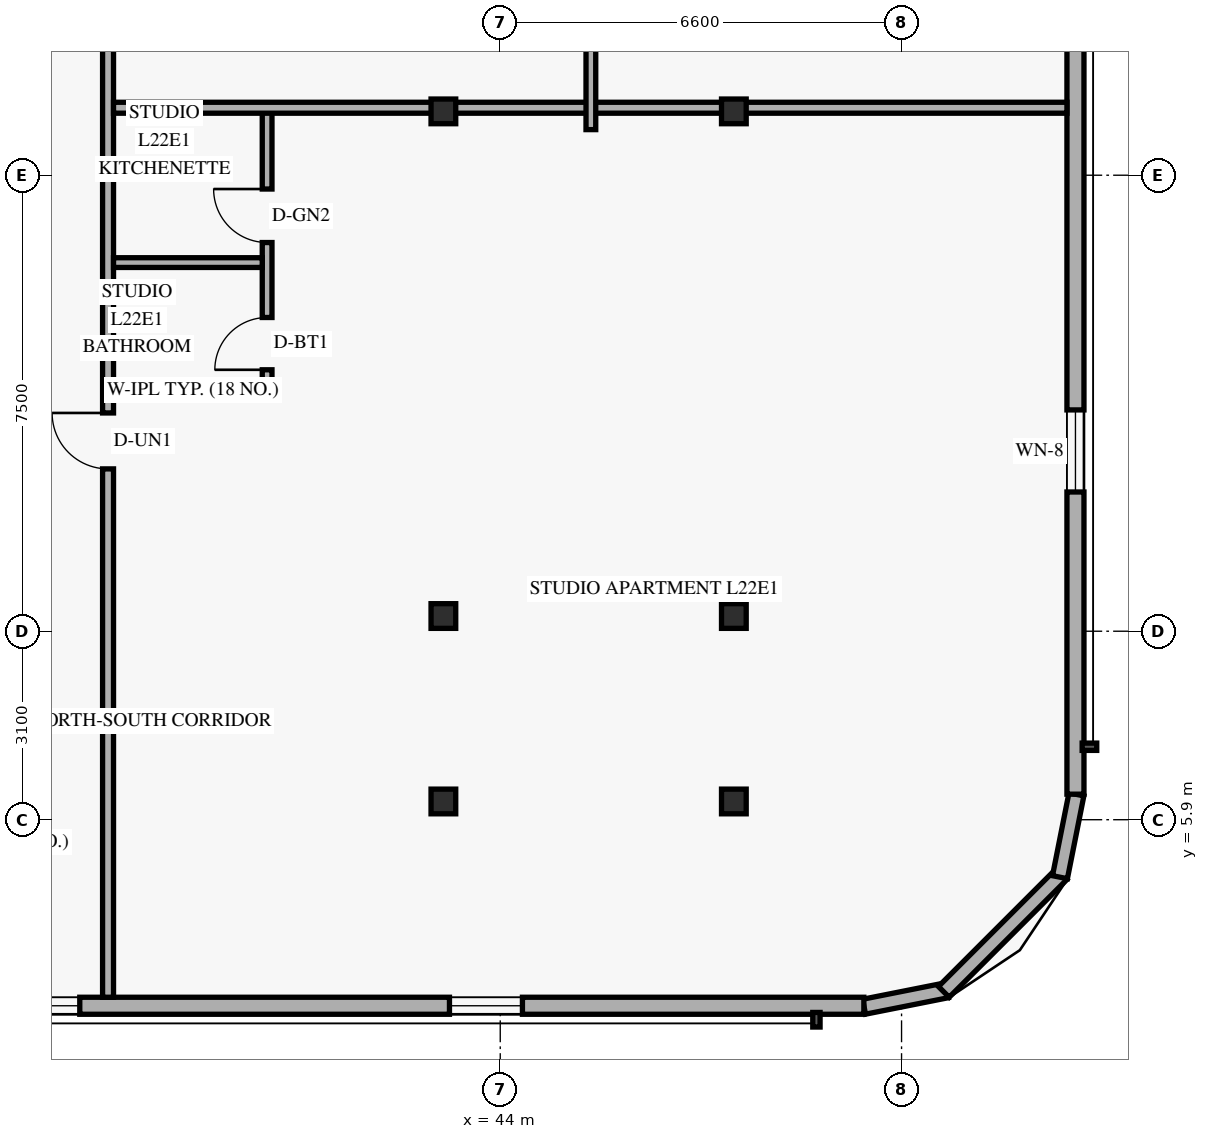
"""IFC4 building model, lengths in metres.
Left out: names, types, materials, properties, quantities, classifications, styles, units other than length and angle.
Written with IfcOpenShell. Run it as: python <this file> out.ifc"""

import sys

from ifc_helpers import new_model, si_unit, direction, frame, frame_2d, origin, origin_2d, place, context, subcontext, project, spatial, rectangle, hollow_rectangle, extrude, element, fill, save


model = new_model("IFC4")
c1 = context("Model", 3, precision=1e-05, world=origin(), true_north=direction((0.0, 1.0)))
c2 = subcontext(c1, "Body", "Model", "MODEL_VIEW")
j1 = project(units=[si_unit("LENGTHUNIT", "METRE"), si_unit("PLANEANGLEUNIT", "RADIAN")], contexts=[c1])
p1 = place(None, origin())
s1 = spatial("IfcSite", under=j1, at=p1, CompositionType="ELEMENT")
p2 = place(p1, origin())
s2 = spatial("IfcBuilding", under=s1, at=p2, CompositionType="ELEMENT")
p3 = place(p2, frame((0.0, 0.0, 87.6)))
s3 = spatial("IfcBuildingStorey", under=s2, at=p3, CompositionType="ELEMENT", Elevation=87.6)
for number, where, z_axis, x_axis in (
    (1, (43.002, 6.2, 0.0), (0.035, 0.0, 0.999), (0.0, 1.0, 0.0)),
    (2, (43.002, 9.25, 0.0), (0.035, 0.0, 0.999), (0.0, 1.0, 0.0)),
    (3, (43.002, 17.55, 0.0), (0.035, 0.0, 0.999), (0.0, 1.0, 0.0)),
):
    element("IfcColumn", number, at=place(p3, frame(where, z_axis=z_axis, x_axis=x_axis)), inside=s3, PredefinedType="COLUMN", context=c2, shape_type="SweptSolid", body=[
        extrude(hollow_rectangle(XDim=0.406, YDim=0.406, WallThickness=0.016, at=origin_2d()), origin(), (0.0, 0.0, 1.0), 3.602),
    ])
for number, where, z_axis, x_axis in (
    (4, (47.738, 6.2, 0.0), (0.058, 0.0, 0.998), (0.0, 1.0, 0.0)),
    (5, (47.738, 9.25, 0.0), (0.058, 0.0, 0.998), (0.0, 1.0, 0.0)),
    (6, (47.738, 17.55, 0.0), (0.058, 0.0, 0.998), (0.0, 1.0, 0.0)),
):
    element("IfcColumn", number, at=place(p3, frame(where, z_axis=z_axis, x_axis=x_axis)), inside=s3, PredefinedType="COLUMN", context=c2, shape_type="SweptSolid", body=[
        extrude(hollow_rectangle(XDim=0.406, YDim=0.406, WallThickness=0.016, at=origin_2d()), origin(), (0.0, 0.0, 1.0), 3.606),
    ])
p4 = place(p3, frame((49.983, 2.824, 0.0), z_axis=(0.0, 0.0, 1.0), x_axis=(0.980809899341, 0.19496651342, 0.0)))
e7 = element("IfcWall", 7, at=p4, inside=s3, PredefinedType="SOLIDWALL", context=c2, shape_type="SweptSolid", body=[
    extrude(rectangle(XDim=1.389, YDim=0.25, at=frame_2d((0.694, 0.0))), origin(), (0.0, 0.0, 1.0), 3.36),
])
p5 = place(p3, frame((51.295, 3.068, 0.0), z_axis=(0.0, 0.0, 1.0), x_axis=(0.707151344399, 0.707062215165, 0.0)))
e8 = element("IfcWall", 8, at=p5, inside=s3, PredefinedType="SOLIDWALL", context=c2, shape_type="SweptSolid", body=[
    extrude(rectangle(XDim=2.739, YDim=0.25, at=frame_2d((1.37, 0.0))), origin(), (0.0, 0.0, 1.0), 3.36),
])
p6 = place(p3, frame((53.205, 4.955, 0.0), z_axis=(0.0, 0.0, 1.0), x_axis=(0.195000137217, 0.980803214965, 0.0)))
e9 = element("IfcWall", 9, at=p6, inside=s3, PredefinedType="SOLIDWALL", context=c2, shape_type="SweptSolid", body=[
    extrude(rectangle(XDim=1.388, YDim=0.25, at=frame_2d((0.694, 0.0))), origin(), (0.0, 0.0, 1.0), 3.36),
])
p7 = place(p3, frame((13.42, 2.84, 0.0), z_axis=(0.0, 0.0, 1.0), x_axis=(1.0, 0.0, 0.0)))
e10 = element("IfcWall", 10, at=p7, inside=s3, PredefinedType="SOLIDWALL", context=c2, shape_type="SweptSolid", body=[
    extrude(rectangle(XDim=36.56, YDim=0.28, at=frame_2d((18.28, 0.0))), origin(), (0.0, 0.0, 1.0), 3.36),
])
p8 = place(p7, frame((3.515, 0.0, 0.85)))
e11 = element("IfcOpeningElement", 11, at=p8, cuts=e10, PredefinedType="OPENING", context=c2, shape_type="SweptSolid", body=[
    extrude(rectangle(XDim=1.2, YDim=1.5, at=frame_2d((0.6, 0.75))), frame((0.0, 0.15, 0.0), z_axis=(0.0, -1.0, 0.0), x_axis=(1.0, 0.0, 0.0)), (0.0, 0.0, 1.0), 0.3),
])
p9 = place(p7, frame((8.68, 0.0, 0.85)))
e12 = element("IfcOpeningElement", 12, at=p9, cuts=e10, PredefinedType="OPENING", context=c2, shape_type="SweptSolid", body=[
    extrude(rectangle(XDim=1.2, YDim=1.5, at=frame_2d((0.6, 0.75))), frame((0.0, 0.15, 0.0), z_axis=(0.0, -1.0, 0.0), x_axis=(1.0, 0.0, 0.0)), (0.0, 0.0, 1.0), 0.3),
])
p10 = place(p7, frame((12.181, 0.0, 0.85)))
e13 = element("IfcOpeningElement", 13, at=p10, cuts=e10, PredefinedType="OPENING", context=c2, shape_type="SweptSolid", body=[
    extrude(rectangle(XDim=1.2, YDim=1.5, at=frame_2d((0.6, 0.75))), frame((0.0, 0.15, 0.0), z_axis=(0.0, -1.0, 0.0), x_axis=(1.0, 0.0, 0.0)), (0.0, 0.0, 1.0), 0.3),
])
p11 = place(p7, frame((18.016, 0.0, 0.85)))
e14 = element("IfcOpeningElement", 14, at=p11, cuts=e10, PredefinedType="OPENING", context=c2, shape_type="SweptSolid", body=[
    extrude(rectangle(XDim=1.2, YDim=1.5, at=frame_2d((0.6, 0.75))), frame((0.0, 0.15, 0.0), z_axis=(0.0, -1.0, 0.0), x_axis=(1.0, 0.0, 0.0)), (0.0, 0.0, 1.0), 0.3),
])
p12 = place(p7, frame((22.465, 0.0, 0.85)))
e15 = element("IfcOpeningElement", 15, at=p12, cuts=e10, PredefinedType="OPENING", context=c2, shape_type="SweptSolid", body=[
    extrude(rectangle(XDim=1.2, YDim=1.5, at=frame_2d((0.6, 0.75))), frame((0.0, 0.15, 0.0), z_axis=(0.0, -1.0, 0.0), x_axis=(1.0, 0.0, 0.0)), (0.0, 0.0, 1.0), 0.3),
])
p13 = place(p7, frame((29.745, 0.0, 0.85)))
e16 = element("IfcOpeningElement", 16, at=p13, cuts=e10, PredefinedType="OPENING", context=c2, shape_type="SweptSolid", body=[
    extrude(rectangle(XDim=1.2, YDim=1.5, at=frame_2d((0.6, 0.75))), frame((0.0, 0.15, 0.0), z_axis=(0.0, -1.0, 0.0), x_axis=(1.0, 0.0, 0.0)), (0.0, 0.0, 1.0), 0.3),
])
p14 = place(p3, frame((53.46, 6.32, 0.0), z_axis=(0.0, 0.0, 1.0), x_axis=(0.0, 1.0, 0.0)))
e17 = element("IfcWall", 17, at=p14, inside=s3, PredefinedType="SOLIDWALL", context=c2, shape_type="SweptSolid", body=[
    extrude(rectangle(XDim=35.36, YDim=0.28, at=frame_2d((17.68, 0.0))), origin(), (0.0, 0.0, 1.0), 3.36),
])
p15 = place(p14, frame((4.97, 0.0, 0.85)))
e18 = element("IfcOpeningElement", 18, at=p15, cuts=e17, PredefinedType="OPENING", context=c2, shape_type="SweptSolid", body=[
    extrude(rectangle(XDim=1.35, YDim=1.55, at=frame_2d((0.675, 0.775))), frame((0.0, 0.15, 0.0), z_axis=(0.0, -1.0, 0.0), x_axis=(1.0, 0.0, 0.0)), (0.0, 0.0, 1.0), 0.3),
])
p16 = place(p14, frame((15.825, 0.0, 0.85)))
e19 = element("IfcOpeningElement", 19, at=p16, cuts=e17, PredefinedType="OPENING", context=c2, shape_type="SweptSolid", body=[
    extrude(rectangle(XDim=1.35, YDim=1.55, at=frame_2d((0.675, 0.775))), frame((0.0, 0.15, 0.0), z_axis=(0.0, -1.0, 0.0), x_axis=(1.0, 0.0, 0.0)), (0.0, 0.0, 1.0), 0.3),
])
p17 = place(p14, frame((23.28, 0.0, 0.85)))
e20 = element("IfcOpeningElement", 20, at=p17, cuts=e17, PredefinedType="OPENING", context=c2, shape_type="SweptSolid", body=[
    extrude(rectangle(XDim=1.35, YDim=1.55, at=frame_2d((0.675, 0.775))), frame((0.0, 0.15, 0.0), z_axis=(0.0, -1.0, 0.0), x_axis=(1.0, 0.0, 0.0)), (0.0, 0.0, 1.0), 0.3),
])
p18 = place(p14, frame((29.845, 0.0, 0.85)))
e21 = element("IfcOpeningElement", 21, at=p18, cuts=e17, PredefinedType="OPENING", context=c2, shape_type="SweptSolid", body=[
    extrude(rectangle(XDim=1.35, YDim=1.55, at=frame_2d((0.675, 0.775))), frame((0.0, 0.15, 0.0), z_axis=(0.0, -1.0, 0.0), x_axis=(1.0, 0.0, 0.0)), (0.0, 0.0, 1.0), 0.3),
])
p19 = place(p3, frame((37.55, 2.98, 0.0), z_axis=(0.0, 0.0, 1.0), x_axis=(0.0, 1.0, 0.0)))
e22 = element("IfcWall", 22, at=p19, inside=s3, PredefinedType="STANDARD", context=c2, shape_type="SweptSolid", body=[
    extrude(rectangle(XDim=42.04, YDim=0.18, at=frame_2d((21.02, 0.0))), origin(), (0.0, 0.0, 1.0), 2.731),
])
p20 = place(p19, frame((8.69, 0.0, 0.0)))
e23 = element("IfcOpeningElement", 23, at=p20, cuts=e22, PredefinedType="OPENING", context=c2, shape_type="SweptSolid", body=[
    extrude(rectangle(XDim=0.92, YDim=2.15, at=frame_2d((0.46, 1.075))), frame((0.0, 0.1, 0.0), z_axis=(0.0, -1.0, 0.0), x_axis=(1.0, 0.0, 0.0)), (0.0, 0.0, 1.0), 0.2),
])
p21 = place(p19, frame((19.043, 0.0, 0.0)))
e24 = element("IfcOpeningElement", 24, at=p21, cuts=e22, PredefinedType="OPENING", context=c2, shape_type="SweptSolid", body=[
    extrude(rectangle(XDim=0.92, YDim=2.15, at=frame_2d((0.46, 1.075))), frame((0.0, 0.1, 0.0), z_axis=(0.0, -1.0, 0.0), x_axis=(1.0, 0.0, 0.0)), (0.0, 0.0, 1.0), 0.2),
])
p22 = place(p19, frame((32.145, 0.0, 0.0)))
e25 = element("IfcOpeningElement", 25, at=p22, cuts=e22, PredefinedType="OPENING", context=c2, shape_type="SweptSolid", body=[
    extrude(rectangle(XDim=0.92, YDim=2.15, at=frame_2d((0.46, 1.075))), frame((0.0, 0.1, 0.0), z_axis=(0.0, -1.0, 0.0), x_axis=(1.0, 0.0, 0.0)), (0.0, 0.0, 1.0), 0.2),
])
p23 = place(p3, frame((37.64, 12.97, 0.0), z_axis=(0.0, 0.0, 1.0), x_axis=(1.0, 0.0, 0.0)))
e26 = element("IfcWall", 26, at=p23, inside=s3, PredefinedType="PLUMBINGWALL", context=c2, shape_type="SweptSolid", body=[
    extrude(rectangle(XDim=2.606, YDim=0.16, at=frame_2d((1.303, 0.0))), origin(), (0.0, 0.0, 1.0), 3.36),
])
p24 = place(p3, frame((40.166, 12.88, 0.0), z_axis=(0.0, 0.0, 1.0), x_axis=(0.0, 1.0, 0.0)))
e27 = element("IfcWall", 27, at=p24, inside=s3, PredefinedType="PLUMBINGWALL", context=c2, shape_type="SweptSolid", body=[
    extrude(rectangle(XDim=4.73, YDim=0.16, at=frame_2d((2.365, 0.0))), origin(), (0.0, 0.0, 1.0), 2.731),
])
p25 = place(p24, frame((0.42, 0.0, 0.0)))
e28 = element("IfcOpeningElement", 28, at=p25, cuts=e27, PredefinedType="OPENING", context=c2, shape_type="SweptSolid", body=[
    extrude(rectangle(XDim=0.86, YDim=2.12, at=frame_2d((0.43, 1.06))), frame((0.0, 0.09, 0.0), z_axis=(0.0, -1.0, 0.0), x_axis=(1.0, 0.0, 0.0)), (0.0, 0.0, 1.0), 0.18),
])
p26 = place(p24, frame((2.513, 0.0, 0.0)))
e29 = element("IfcOpeningElement", 29, at=p26, cuts=e27, PredefinedType="OPENING", context=c2, shape_type="SweptSolid", body=[
    extrude(rectangle(XDim=0.88, YDim=2.12, at=frame_2d((0.44, 1.06))), frame((0.0, 0.09, 0.0), z_axis=(0.0, -1.0, 0.0), x_axis=(1.0, 0.0, 0.0)), (0.0, 0.0, 1.0), 0.18),
])
p27 = place(p3, frame((37.64, 15.063, 0.0), z_axis=(0.0, 0.0, 1.0), x_axis=(1.0, 0.0, 0.0)))
e30 = element("IfcWall", 30, at=p27, inside=s3, PredefinedType="PLUMBINGWALL", context=c2, shape_type="SweptSolid", body=[
    extrude(rectangle(XDim=2.446, YDim=0.16, at=frame_2d((1.223, 0.0))), origin(), (0.0, 0.0, 1.0), 3.36),
])
p28 = place(p3, frame((37.64, 17.61, 0.0), z_axis=(0.0, 0.0, 1.0), x_axis=(1.0, 0.0, 0.0)))
e31 = element("IfcWall", 31, at=p28, inside=s3, PredefinedType="PARTITIONING", context=c2, shape_type="SweptSolid", body=[
    extrude(rectangle(XDim=15.68, YDim=0.18, at=frame_2d((7.84, 0.0))), origin(), (0.0, 0.0, 1.0), 2.731),
])
p29 = place(p3, frame((45.49, 17.25, 0.0), z_axis=(0.0, 0.0, 1.0), x_axis=(0.0, 1.0, 0.0)))
e32 = element("IfcWall", 32, at=p29, inside=s3, PredefinedType="PARTITIONING", context=c2, shape_type="SweptSolid", body=[
    extrude(rectangle(XDim=10.86, YDim=0.16, at=frame_2d((5.43, 0.0))), origin(), (0.0, 0.0, 1.0), 2.731),
])
p30 = place(p29, frame((4.67, 0.0, 0.0)))
e33 = element("IfcOpeningElement", 33, at=p30, cuts=e32, PredefinedType="OPENING", context=c2, shape_type="SweptSolid", body=[
    extrude(rectangle(XDim=0.95, YDim=2.15, at=frame_2d((0.475, 1.075))), frame((0.0, 0.09, 0.0), z_axis=(0.0, -1.0, 0.0), x_axis=(1.0, 0.0, 0.0)), (0.0, 0.0, 1.0), 0.18),
])
p31 = place(p12, origin())
e34 = element("IfcWindow", 34, at=p31, inside=s3, PartitioningType="SINGLE_PANEL", PredefinedType="WINDOW", context=c2, shape_type="SweptSolid", body=[
    extrude(rectangle(XDim=1.2, YDim=1.5, at=frame_2d((0.6, 0.75))), frame((0.0, 0.03, 0.0), z_axis=(0.0, -1.0, 0.0), x_axis=(1.0, 0.0, 0.0)), (0.0, 0.0, 1.0), 0.06),
])
fill(e15, e34)
p32 = place(p13, origin())
e35 = element("IfcWindow", 35, at=p32, inside=s3, PartitioningType="SINGLE_PANEL", PredefinedType="WINDOW", context=c2, shape_type="SweptSolid", body=[
    extrude(rectangle(XDim=1.2, YDim=1.5, at=frame_2d((0.6, 0.75))), frame((0.0, 0.03, 0.0), z_axis=(0.0, -1.0, 0.0), x_axis=(1.0, 0.0, 0.0)), (0.0, 0.0, 1.0), 0.06),
])
fill(e16, e35)
p33 = place(p15, origin())
e36 = element("IfcWindow", 36, at=p33, inside=s3, PartitioningType="SINGLE_PANEL", PredefinedType="WINDOW", context=c2, shape_type="SweptSolid", body=[
    extrude(rectangle(XDim=1.35, YDim=1.55, at=frame_2d((0.675, 0.775))), frame((0.0, 0.03, 0.0), z_axis=(0.0, -1.0, 0.0), x_axis=(1.0, 0.0, 0.0)), (0.0, 0.0, 1.0), 0.06),
])
fill(e18, e36)
p34 = place(p20, origin())
e37 = element("IfcDoor", 37, at=p34, inside=s3, OperationType="SINGLE_SWING_RIGHT", PredefinedType="DOOR", context=c2, shape_type="SweptSolid", body=[
    extrude(rectangle(XDim=0.92, YDim=2.15, at=frame_2d((0.46, 1.075))), frame((0.0, 0.025, 0.0), z_axis=(0.0, -1.0, 0.0), x_axis=(1.0, 0.0, 0.0)), (0.0, 0.0, 1.0), 0.05),
])
fill(e23, e37)
p35 = place(p25, origin())
e38 = element("IfcDoor", 38, at=p35, inside=s3, OperationType="SINGLE_SWING_LEFT", PredefinedType="DOOR", context=c2, shape_type="SweptSolid", body=[
    extrude(rectangle(XDim=0.86, YDim=2.12, at=frame_2d((0.43, 1.06))), frame((0.0, 0.025, 0.0), z_axis=(0.0, -1.0, 0.0), x_axis=(1.0, 0.0, 0.0)), (0.0, 0.0, 1.0), 0.05),
])
fill(e28, e38)
p36 = place(p26, origin())
e39 = element("IfcDoor", 39, at=p36, inside=s3, OperationType="SINGLE_SWING_RIGHT", PredefinedType="DOOR", context=c2, shape_type="SweptSolid", body=[
    extrude(rectangle(XDim=0.88, YDim=2.12, at=frame_2d((0.44, 1.06))), frame((0.0, 0.025, 0.0), z_axis=(0.0, -1.0, 0.0), x_axis=(1.0, 0.0, 0.0)), (0.0, 0.0, 1.0), 0.05),
])
fill(e29, e39)
save(model, sys.argv[1])
